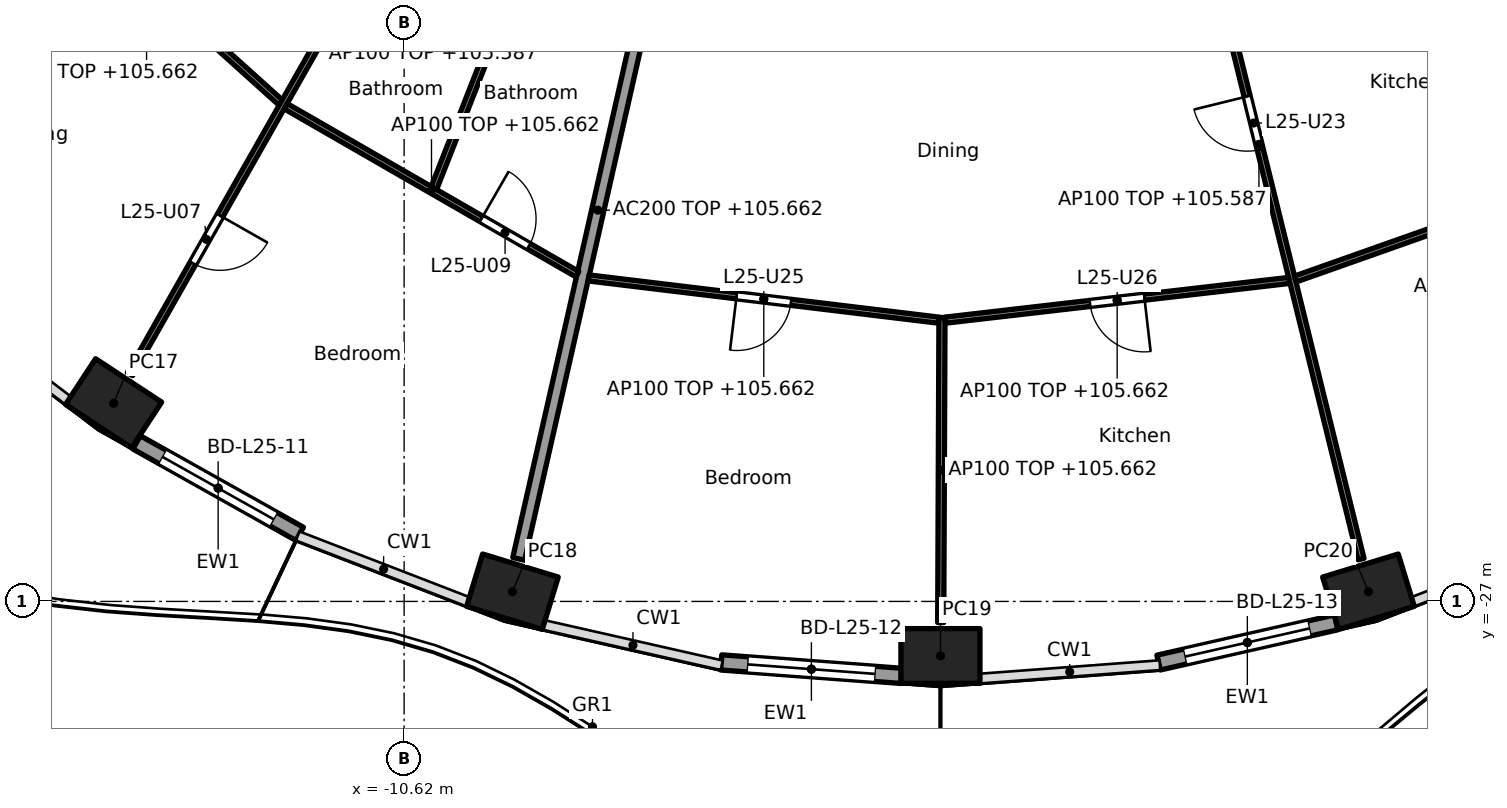
"""IFC4 building model, lengths in metres.
Left out: names, types, materials, properties, quantities, classifications, styles, units other than length and angle.
Written with IfcOpenShell. Run it as: python <this file> out.ifc"""

import sys

from ifc_helpers import new_model, si_unit, direction, frame, frame_2d, origin, origin_2d, place, context, subcontext, project, spatial, rectangle, hollow_rectangle, extrude, element, fill, save


model = new_model("IFC4")
c1 = context("Model", 3, precision=1e-05, world=origin(), true_north=direction((0.0, 1.0)))
c2 = subcontext(c1, "Body", "Model", "MODEL_VIEW")
j1 = project(units=[si_unit("LENGTHUNIT", "METRE"), si_unit("PLANEANGLEUNIT", "RADIAN")], contexts=[c1])
p1 = place(None, origin())
s1 = spatial("IfcSite", under=j1, at=p1, CompositionType="ELEMENT")
p2 = place(p1, origin())
s2 = spatial("IfcBuilding", under=s1, at=p2, CompositionType="ELEMENT")
p3 = place(p2, frame((0.0, 0.0, 102.9)))
s3 = spatial("IfcBuildingStorey", under=s2, at=p3, CompositionType="ELEMENT", Elevation=102.9)
for number, where, z_axis, x_axis in (
    (1, (-15.397, -23.742, 0.0), (0.0, 0.0, 1.0), (0.836, -0.549, 0.0)),
    (2, (-8.839, -26.841, 0.0), (0.0, 0.0, 1.0), (0.957, -0.292, 0.0)),
    (3, (-1.8, -27.897, 0.0), (0.0, 0.0, 1.0), (1.0, 0.0, 0.0)),
    (4, (5.239, -26.841, 0.0), (0.0, 0.0, 1.0), (0.957, 0.292, 0.0)),
):
    element("IfcColumn", number, at=place(p3, frame(where, z_axis=z_axis, x_axis=x_axis)), inside=s3, PredefinedType="COLUMN", context=c2, shape_type="SweptSolid", body=[
        extrude(hollow_rectangle(XDim=1.3, YDim=0.9, WallThickness=0.045, at=origin_2d()), origin(), (0.0, 0.0, 1.0), 3.7),
    ])
p4 = place(p3, frame((-12.337, -25.889, 0.0), z_axis=(0.0, 0.0, 1.0), x_axis=(-0.872090167423, 0.489345215451, 0.0)))
e5 = element("IfcWall", 5, at=p4, inside=s3, PredefinedType="SOLIDWALL", context=c2, shape_type="SweptSolid", body=[
    extrude(rectangle(XDim=3.076, YDim=0.25, at=frame_2d((1.538, 0.0))), origin(), (0.0, 0.0, 1.0), 3.44),
])
p5 = place(p4, frame((0.488, 0.0, 0.0)))
e6 = element("IfcOpeningElement", 6, at=p5, cuts=e5, PredefinedType="OPENING", context=c2, shape_type="SweptSolid", body=[
    extrude(rectangle(XDim=2.1, YDim=2.4, at=frame_2d((1.05, 1.2))), frame((0.0, 0.135, 0.0), z_axis=(0.0, -1.0, 0.0), x_axis=(1.0, 0.0, 0.0)), (0.0, 0.0, 1.0), 0.27),
])
p6 = place(p3, frame((-2.439, -28.224, 0.0), z_axis=(0.0, 0.0, 1.0), x_axis=(-0.997225719788, 0.074436978672, 0.0)))
e7 = element("IfcWall", 7, at=p6, inside=s3, PredefinedType="SOLIDWALL", context=c2, shape_type="SweptSolid", body=[
    extrude(rectangle(XDim=2.975, YDim=0.25, at=frame_2d((1.487, 0.0))), origin(), (0.0, 0.0, 1.0), 3.44),
])
p7 = place(p6, frame((0.438, 0.0, 0.0)))
e8 = element("IfcOpeningElement", 8, at=p7, cuts=e7, PredefinedType="OPENING", context=c2, shape_type="SweptSolid", body=[
    extrude(rectangle(XDim=2.1, YDim=2.4, at=frame_2d((1.05, 1.2))), frame((0.0, 0.135, 0.0), z_axis=(0.0, -1.0, 0.0), x_axis=(1.0, 0.0, 0.0)), (0.0, 0.0, 1.0), 0.27),
])
p8 = place(p3, frame((4.707, -27.345, 0.0), z_axis=(0.0, 0.0, 1.0), x_axis=(-0.975317607872, -0.220806620767, 0.0)))
e9 = element("IfcWall", 9, at=p8, inside=s3, PredefinedType="SOLIDWALL", context=c2, shape_type="SweptSolid", body=[
    extrude(rectangle(XDim=2.993, YDim=0.25, at=frame_2d((1.497, 0.0))), origin(), (0.0, 0.0, 1.0), 3.44),
])
p9 = place(p8, frame((0.447, 0.0, 0.0)))
e10 = element("IfcOpeningElement", 10, at=p9, cuts=e9, PredefinedType="OPENING", context=c2, shape_type="SweptSolid", body=[
    extrude(rectangle(XDim=2.1, YDim=2.4, at=frame_2d((1.05, 1.2))), frame((0.0, 0.135, 0.0), z_axis=(0.0, -1.0, 0.0), x_axis=(1.0, 0.0, 0.0)), (0.0, 0.0, 1.0), 0.27),
])
p10 = place(p3, frame((-6.134, -14.831, 0.0), z_axis=(0.0, 0.0, 1.0), x_axis=(-0.221225405869, -0.975222702667, 0.0)))
e11 = element("IfcWall", 11, at=p10, inside=s3, PredefinedType="PARTITIONING", context=c2, shape_type="SweptSolid", body=[
    extrude(rectangle(XDim=11.761, YDim=0.2, at=frame_2d((5.88, 0.0))), origin(), (0.0, 0.0, 1.0), 2.762),
])
p11 = place(p3, frame((-17.063, -14.827, 0.0), z_axis=(0.0, 0.0, 1.0), x_axis=(0.743478142868, -0.668760234373, 0.0)))
e12 = element("IfcWall", 12, at=p11, inside=s3, PredefinedType="PARTITIONING", context=c2, shape_type="SweptSolid", body=[
    extrude(rectangle(XDim=5.937, YDim=0.1, at=frame_2d((2.969, 0.0))), origin(), (0.0, 0.0, 1.0), 2.762),
])
p12 = place(p11, frame((2.519, 0.0, 0.0)))
e13 = element("IfcOpeningElement", 13, at=p12, cuts=e12, PredefinedType="OPENING", context=c2, shape_type="SweptSolid", body=[
    extrude(rectangle(XDim=0.9, YDim=2.1, at=frame_2d((0.45, 1.05))), frame((0.0, 0.06, 0.0), z_axis=(0.0, -1.0, 0.0), x_axis=(1.0, 0.0, 0.0)), (0.0, 0.0, 1.0), 0.12),
])
p13 = place(p3, frame((-7.707, -10.198, 0.0), z_axis=(0.0, 0.0, 1.0), x_axis=(-0.49395524734, -0.869487328042, 0.0)))
e14 = element("IfcWall", 14, at=p13, inside=s3, PredefinedType="PARTITIONING", context=c2, shape_type="SweptSolid", body=[
    extrude(rectangle(XDim=15.025, YDim=0.1, at=frame_2d((7.512, 0.0))), origin(), (0.0, 0.0, 1.0), 2.687),
])
p14 = place(p13, frame((1.684, 0.0, 0.0)))
e15 = element("IfcOpeningElement", 15, at=p14, cuts=e14, PredefinedType="OPENING", context=c2, shape_type="SweptSolid", body=[
    extrude(rectangle(XDim=0.9, YDim=2.1, at=frame_2d((0.45, 1.05))), frame((0.0, 0.06, 0.0), z_axis=(0.0, -1.0, 0.0), x_axis=(1.0, 0.0, 0.0)), (0.0, 0.0, 1.0), 0.12),
])
p15 = place(p13, frame((6.648, 0.0, 0.0)))
e16 = element("IfcOpeningElement", 16, at=p15, cuts=e14, PredefinedType="OPENING", context=c2, shape_type="SweptSolid", body=[
    extrude(rectangle(XDim=0.9, YDim=2.1, at=frame_2d((0.45, 1.05))), frame((0.0, 0.06, 0.0), z_axis=(0.0, -1.0, 0.0), x_axis=(1.0, 0.0, 0.0)), (0.0, 0.0, 1.0), 0.12),
])
p16 = place(p13, frame((12.027, 0.0, 0.0)))
e17 = element("IfcOpeningElement", 17, at=p16, cuts=e14, PredefinedType="OPENING", context=c2, shape_type="SweptSolid", body=[
    extrude(rectangle(XDim=0.9, YDim=2.1, at=frame_2d((0.45, 1.05))), frame((0.0, 0.06, 0.0), z_axis=(0.0, -1.0, 0.0), x_axis=(1.0, 0.0, 0.0)), (0.0, 0.0, 1.0), 0.12),
])
p17 = place(p3, frame((-12.568, -18.856, 0.0), z_axis=(0.0, 0.0, 1.0), x_axis=(0.866533437451, -0.499119025664, 0.0)))
e18 = element("IfcWall", 18, at=p17, inside=s3, PredefinedType="PARTITIONING", context=c2, shape_type="SweptSolid", body=[
    extrude(rectangle(XDim=5.535, YDim=0.1, at=frame_2d((2.768, 0.0))), origin(), (0.0, 0.0, 1.0), 2.762),
])
p18 = place(p17, frame((3.714, 0.0, 0.0)))
e19 = element("IfcOpeningElement", 19, at=p18, cuts=e18, PredefinedType="OPENING", context=c2, shape_type="SweptSolid", body=[
    extrude(rectangle(XDim=0.9, YDim=2.1, at=frame_2d((0.45, 1.05))), frame((0.0, 0.06, 0.0), z_axis=(0.0, -1.0, 0.0), x_axis=(1.0, 0.0, 0.0)), (0.0, 0.0, 1.0), 0.12),
])
p19 = place(p3, frame((-8.177, -15.231, 0.0), z_axis=(0.0, 0.0, 1.0), x_axis=(-0.365520869553, -0.930803144559, 0.0)))
e20 = element("IfcWall", 20, at=p19, inside=s3, PredefinedType="PARTITIONING", context=c2, shape_type="SweptSolid", body=[
    extrude(rectangle(XDim=5.342, YDim=0.1, at=frame_2d((2.671, 0.0))), origin(), (0.0, 0.0, 1.0), 3.44),
])
p20 = place(p3, frame((-7.586, -21.68, 0.0), z_axis=(0.0, 0.0, 1.0), x_axis=(0.992810189026, -0.119699325668, 0.0)))
e21 = element("IfcWall", 21, at=p20, inside=s3, PredefinedType="PARTITIONING", context=c2, shape_type="SweptSolid", body=[
    extrude(rectangle(XDim=5.803, YDim=0.1, at=frame_2d((2.901, 0.0))), origin(), (0.0, 0.0, 1.0), 2.762),
])
p21 = place(p20, frame((2.451, 0.0, 0.0)))
e22 = element("IfcOpeningElement", 22, at=p21, cuts=e21, PredefinedType="OPENING", context=c2, shape_type="SweptSolid", body=[
    extrude(rectangle(XDim=0.9, YDim=2.1, at=frame_2d((0.45, 1.05))), frame((0.0, 0.06, 0.0), z_axis=(0.0, -1.0, 0.0), x_axis=(1.0, 0.0, 0.0)), (0.0, 0.0, 1.0), 0.12),
])
p22 = place(p3, frame((-1.775, -22.331, 0.0), z_axis=(0.0, 0.0, 1.0), x_axis=(-0.004088153894, -0.999991643464, 0.0)))
e23 = element("IfcWall", 23, at=p22, inside=s3, PredefinedType="PARTITIONING", context=c2, shape_type="SweptSolid", body=[
    extrude(rectangle(XDim=5.016, YDim=0.1, at=frame_2d((2.508, 0.0))), origin(), (0.0, 0.0, 1.0), 2.762),
])
p23 = place(p3, frame((-1.726, -22.375, 0.0), z_axis=(0.0, 0.0, 1.0), x_axis=(0.99339223329, 0.114768771187, 0.0)))
e24 = element("IfcWall", 24, at=p23, inside=s3, PredefinedType="PARTITIONING", context=c2, shape_type="SweptSolid", body=[
    extrude(rectangle(XDim=5.701, YDim=0.1, at=frame_2d((2.851, 0.0))), origin(), (0.0, 0.0, 1.0), 2.762),
])
p24 = place(p23, frame((2.4, 0.0, 0.0)))
e25 = element("IfcOpeningElement", 25, at=p24, cuts=e24, PredefinedType="OPENING", context=c2, shape_type="SweptSolid", body=[
    extrude(rectangle(XDim=0.9, YDim=2.1, at=frame_2d((0.45, 1.05))), frame((0.0, 0.06, 0.0), z_axis=(0.0, -1.0, 0.0), x_axis=(1.0, 0.0, 0.0)), (0.0, 0.0, 1.0), 0.12),
])
p25 = place(p3, frame((1.759, -12.662, 0.0), z_axis=(0.0, 0.0, 1.0), x_axis=(0.239021819854, -0.971014196412, 0.0)))
e26 = element("IfcWall", 26, at=p25, inside=s3, PredefinedType="PARTITIONING", context=c2, shape_type="SweptSolid", body=[
    extrude(rectangle(XDim=14.05, YDim=0.1, at=frame_2d((7.025, 0.0))), origin(), (0.0, 0.0, 1.0), 2.687),
])
p26 = place(p25, frame((6.214, 0.0, 0.0)))
e27 = element("IfcOpeningElement", 27, at=p26, cuts=e26, PredefinedType="OPENING", context=c2, shape_type="SweptSolid", body=[
    extrude(rectangle(XDim=0.9, YDim=2.1, at=frame_2d((0.45, 1.05))), frame((0.0, 0.06, 0.0), z_axis=(0.0, -1.0, 0.0), x_axis=(1.0, 0.0, 0.0)), (0.0, 0.0, 1.0), 0.12),
])
p27 = place(p25, frame((1.552, 0.0, 0.0)))
e28 = element("IfcOpeningElement", 28, at=p27, cuts=e26, PredefinedType="OPENING", context=c2, shape_type="SweptSolid", body=[
    extrude(rectangle(XDim=0.9, YDim=2.1, at=frame_2d((0.45, 1.05))), frame((0.0, 0.06, 0.0), z_axis=(0.0, -1.0, 0.0), x_axis=(1.0, 0.0, 0.0)), (0.0, 0.0, 1.0), 0.12),
])
p28 = place(p3, frame((4.034, -21.698, 0.0), z_axis=(0.0, 0.0, 1.0), x_axis=(0.942864271692, 0.333177077794, 0.0)))
e29 = element("IfcWall", 29, at=p28, inside=s3, PredefinedType="PARTITIONING", context=c2, shape_type="SweptSolid", body=[
    extrude(rectangle(XDim=5.545, YDim=0.1, at=frame_2d((2.772, 0.0))), origin(), (0.0, 0.0, 1.0), 2.762),
])
p29 = place(p5, origin())
e30 = element("IfcDoor", 30, at=p29, inside=s3, OperationType="SLIDING_TO_LEFT", PredefinedType="DOOR", context=c2, shape_type="SweptSolid", body=[
    extrude(rectangle(XDim=2.1, YDim=2.4, at=frame_2d((1.05, 1.2))), frame((0.0, 0.025, 0.0), z_axis=(0.0, -1.0, 0.0), x_axis=(1.0, 0.0, 0.0)), (0.0, 0.0, 1.0), 0.05),
])
fill(e6, e30)
p30 = place(p7, origin())
e31 = element("IfcDoor", 31, at=p30, inside=s3, OperationType="SLIDING_TO_LEFT", PredefinedType="DOOR", context=c2, shape_type="SweptSolid", body=[
    extrude(rectangle(XDim=2.1, YDim=2.4, at=frame_2d((1.05, 1.2))), frame((0.0, 0.025, 0.0), z_axis=(0.0, -1.0, 0.0), x_axis=(1.0, 0.0, 0.0)), (0.0, 0.0, 1.0), 0.05),
])
fill(e8, e31)
p31 = place(p9, origin())
e32 = element("IfcDoor", 32, at=p31, inside=s3, OperationType="SLIDING_TO_LEFT", PredefinedType="DOOR", context=c2, shape_type="SweptSolid", body=[
    extrude(rectangle(XDim=2.1, YDim=2.4, at=frame_2d((1.05, 1.2))), frame((0.0, 0.025, 0.0), z_axis=(0.0, -1.0, 0.0), x_axis=(1.0, 0.0, 0.0)), (0.0, 0.0, 1.0), 0.05),
])
fill(e10, e32)
p32 = place(p16, origin())
e33 = element("IfcDoor", 33, at=p32, inside=s3, OperationType="SINGLE_SWING_LEFT", PredefinedType="DOOR", context=c2, shape_type="SweptSolid", body=[
    extrude(rectangle(XDim=0.9, YDim=2.1, at=frame_2d((0.45, 1.05))), frame((0.0, 0.025, 0.0), z_axis=(0.0, -1.0, 0.0), x_axis=(1.0, 0.0, 0.0)), (0.0, 0.0, 1.0), 0.05),
])
fill(e17, e33)
p33 = place(p18, origin())
e34 = element("IfcDoor", 34, at=p33, inside=s3, OperationType="SINGLE_SWING_LEFT", PredefinedType="DOOR", context=c2, shape_type="SweptSolid", body=[
    extrude(rectangle(XDim=0.9, YDim=2.1, at=frame_2d((0.45, 1.05))), frame((0.0, 0.025, 0.0), z_axis=(0.0, -1.0, 0.0), x_axis=(1.0, 0.0, 0.0)), (0.0, 0.0, 1.0), 0.05),
])
fill(e19, e34)
p34 = place(p26, frame((0.9, 0.0, 0.0), x_axis=(-1.0, 0.0, 0.0)))
e35 = element("IfcDoor", 35, at=p34, inside=s3, OperationType="SINGLE_SWING_RIGHT", PredefinedType="DOOR", context=c2, shape_type="SweptSolid", body=[
    extrude(rectangle(XDim=0.9, YDim=2.1, at=frame_2d((0.45, 1.05))), frame((0.0, 0.025, 0.0), z_axis=(0.0, -1.0, 0.0), x_axis=(1.0, 0.0, 0.0)), (0.0, 0.0, 1.0), 0.05),
])
fill(e27, e35)
p35 = place(p21, frame((0.9, 0.0, 0.0), x_axis=(-1.0, 0.0, 0.0)))
e36 = element("IfcDoor", 36, at=p35, inside=s3, OperationType="SINGLE_SWING_RIGHT", PredefinedType="DOOR", context=c2, shape_type="SweptSolid", body=[
    extrude(rectangle(XDim=0.9, YDim=2.1, at=frame_2d((0.45, 1.05))), frame((0.0, 0.025, 0.0), z_axis=(0.0, -1.0, 0.0), x_axis=(1.0, 0.0, 0.0)), (0.0, 0.0, 1.0), 0.05),
])
fill(e22, e36)
p36 = place(p24, frame((0.9, 0.0, 0.0), x_axis=(-1.0, 0.0, 0.0)))
e37 = element("IfcDoor", 37, at=p36, inside=s3, OperationType="SINGLE_SWING_LEFT", PredefinedType="DOOR", context=c2, shape_type="SweptSolid", body=[
    extrude(rectangle(XDim=0.9, YDim=2.1, at=frame_2d((0.45, 1.05))), frame((0.0, 0.025, 0.0), z_axis=(0.0, -1.0, 0.0), x_axis=(1.0, 0.0, 0.0)), (0.0, 0.0, 1.0), 0.05),
])
fill(e25, e37)
save(model, sys.argv[1])
